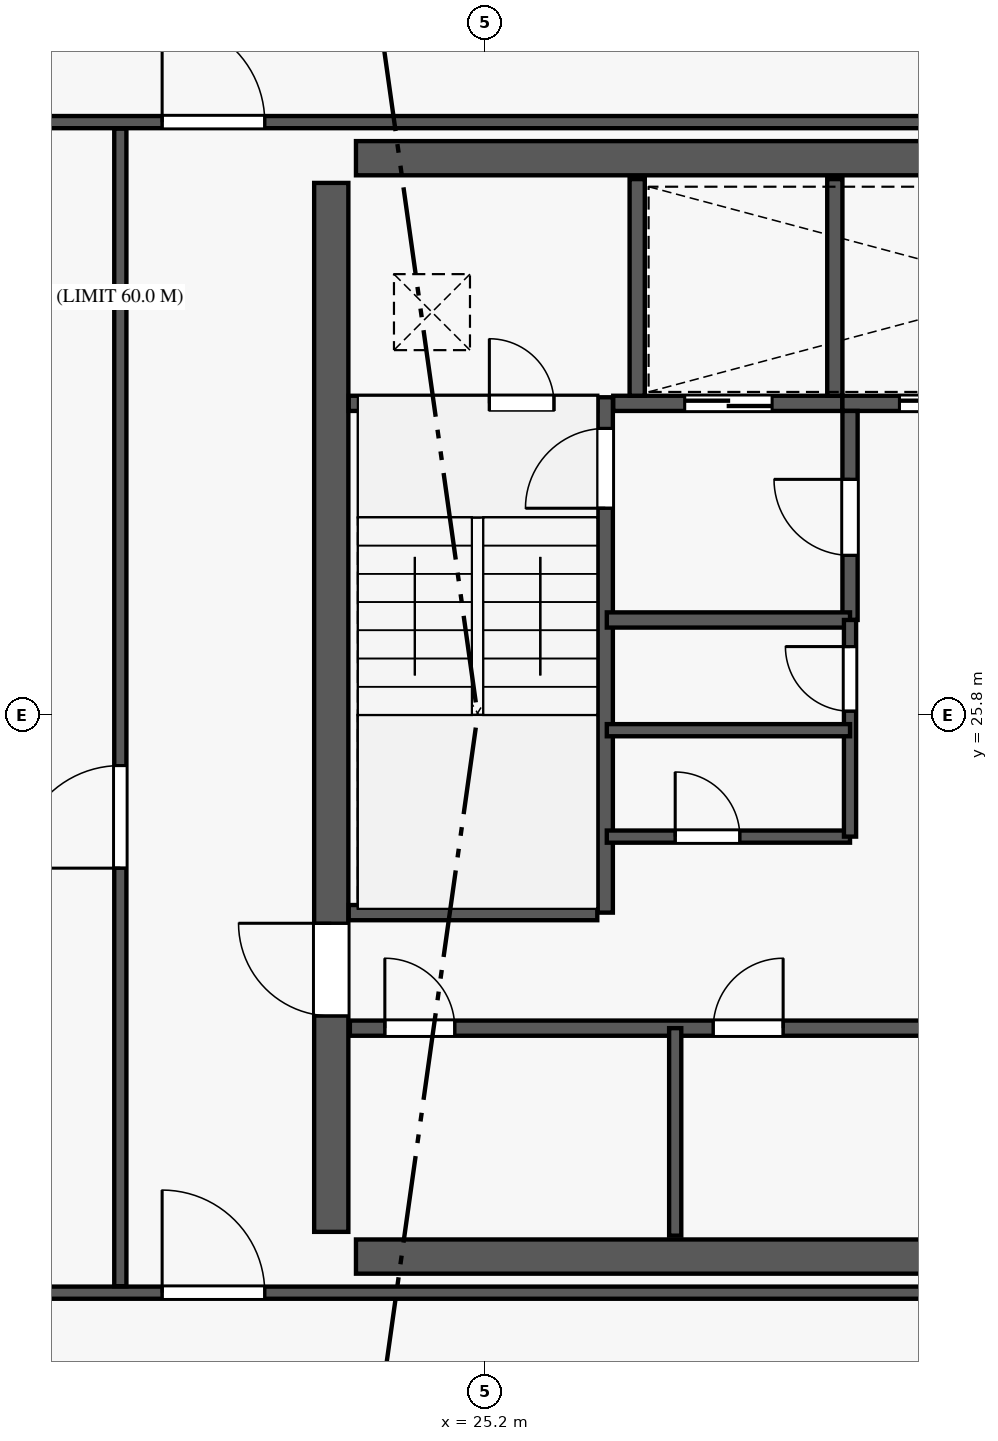
"""IFC4 building model, lengths in metres.
Left out: names, types, materials, properties, quantities, classifications, styles, units other than length and angle.
Written with IfcOpenShell. Run it as: python <this file> out.ifc"""

import sys

from ifc_helpers import new_model, si_unit, direction, frame, frame_2d, origin, origin_2d, place, context, subcontext, project, spatial, rectangle, extrude, element, fill, save


model = new_model("IFC4")
c1 = context("Model", 3, precision=1e-05, world=origin(), true_north=direction((0.0, 1.0)))
c2 = subcontext(c1, "Body", "Model", "MODEL_VIEW")
j1 = project(units=[si_unit("LENGTHUNIT", "METRE"), si_unit("PLANEANGLEUNIT", "RADIAN")], contexts=[c1])
p1 = place(None, origin())
s1 = spatial("IfcSite", under=j1, at=p1, CompositionType="ELEMENT")
p2 = place(p1, origin())
s2 = spatial("IfcBuilding", under=s1, at=p2, CompositionType="ELEMENT")
p3 = place(p2, frame((0.0, 0.0, 278.1)))
s3 = spatial("IfcBuildingStorey", under=s2, at=p3, CompositionType="ELEMENT", Elevation=278.1)
for number, where, z_axis, x_axis in (
    (1, (23.175, 18.675, 0.0), (0.0, 0.0, 1.0), (1.0, 0.0, 0.0)),
    (2, (23.175, 33.125, 0.0), (0.0, 0.0, 1.0), (1.0, 0.0, 0.0)),
):
    element("IfcColumn", number, at=place(p3, frame(where, z_axis=z_axis, x_axis=x_axis)), inside=s3, PredefinedType="COLUMN", context=c2, shape_type="SweptSolid", body=[
        extrude(rectangle(XDim=0.65, YDim=0.65, at=origin_2d()), origin(), (0.0, 0.0, 1.0), 5.4),
    ])
for number, where, z_axis, x_axis in (
    (3, (23.5, 18.675, 0.0), (0.0, 0.0, 1.0), (1.0, 0.0, 0.0)),
    (4, (23.5, 33.125, 0.0), (0.0, 0.0, 1.0), (1.0, 0.0, 0.0)),
):
    element("IfcWall", number, at=place(p3, frame(where, z_axis=z_axis, x_axis=x_axis)), inside=s3, PredefinedType="SHEAR", context=c2, shape_type="SweptSolid", body=[
        extrude(rectangle(XDim=17.8, YDim=0.45, at=frame_2d((8.9, 0.0))), origin(), (0.0, 0.0, 1.0), 5.2),
    ])
p4 = place(p3, frame((23.175, 19.0, 0.0), z_axis=(0.0, 0.0, 1.0), x_axis=(0.0, 1.0, 0.0)))
e5 = element("IfcWall", 5, at=p4, inside=s3, PredefinedType="SHEAR", context=c2, shape_type="SweptSolid", body=[
    extrude(rectangle(XDim=13.8, YDim=0.45, at=frame_2d((6.9, 0.0))), origin(), (0.0, 0.0, 1.0), 5.2),
])
p5 = place(p4, frame((2.84, 0.0, 0.0)))
e6 = element("IfcOpeningElement", 6, at=p5, cuts=e5, PredefinedType="OPENING", context=c2, shape_type="SweptSolid", body=[
    extrude(rectangle(XDim=1.22, YDim=2.25, at=frame_2d((0.61, 1.125))), frame((0.0, 0.235, 0.0), z_axis=(0.0, -1.0, 0.0), x_axis=(1.0, 0.0, 0.0)), (0.0, 0.0, 1.0), 0.47),
])
p6 = place(p3, frame((26.78, 23.2, 0.0), z_axis=(0.0, 0.0, 1.0), x_axis=(0.0, 1.0, 0.0)))
e7 = element("IfcWall", 7, at=p6, inside=s3, PredefinedType="SHEAR", context=c2, shape_type="SweptSolid", body=[
    extrude(rectangle(XDim=6.78, YDim=0.2, at=frame_2d((3.39, 0.0))), origin(), (0.0, 0.0, 1.0), 5.4),
])
p7 = place(p6, frame((5.32, 0.0, 0.0)))
e8 = element("IfcOpeningElement", 8, at=p7, cuts=e7, PredefinedType="OPENING", context=c2, shape_type="SweptSolid", body=[
    extrude(rectangle(XDim=1.05, YDim=2.15, at=frame_2d((0.525, 1.075))), frame((0.0, 0.11, 0.0), z_axis=(0.0, -1.0, 0.0), x_axis=(1.0, 0.0, 0.0)), (0.0, 0.0, 1.0), 0.22),
])
p8 = place(p3, frame((23.405, 23.2, 0.0), z_axis=(0.0, 0.0, 1.0), x_axis=(1.0, 0.0, 0.0)))
e9 = element("IfcWall", 9, at=p8, inside=s3, PredefinedType="PLUMBINGWALL", context=c2, shape_type="SweptSolid", body=[
    extrude(rectangle(XDim=3.27, YDim=0.2, at=frame_2d((1.635, 0.0))), origin(), (0.0, 0.0, 1.0), 5.2),
])
p9 = place(p3, frame((23.405, 29.9, 0.0), z_axis=(0.0, 0.0, 1.0), x_axis=(1.0, 0.0, 0.0)))
e10 = element("IfcWall", 10, at=p9, inside=s3, PredefinedType="PLUMBINGWALL", context=c2, shape_type="SweptSolid", body=[
    extrude(rectangle(XDim=3.27, YDim=0.2, at=frame_2d((1.635, 0.0))), origin(), (0.0, 0.0, 1.0), 5.2),
])
p10 = place(p9, frame((1.85, 0.0, 0.0)))
e11 = element("IfcOpeningElement", 11, at=p10, cuts=e10, PredefinedType="OPENING", context=c2, shape_type="SweptSolid", body=[
    extrude(rectangle(XDim=0.85, YDim=2.05, at=frame_2d((0.425, 1.025))), frame((0.0, 0.11, 0.0), z_axis=(0.0, -1.0, 0.0), x_axis=(1.0, 0.0, 0.0)), (0.0, 0.0, 1.0), 0.22),
])
p11 = place(p3, frame((26.885, 29.9, 0.0), z_axis=(0.0, 0.0, 1.0), x_axis=(1.0, 0.0, 0.0)))
e12 = element("IfcWall", 12, at=p11, inside=s3, PredefinedType="PLUMBINGWALL", context=c2, shape_type="SweptSolid", body=[
    extrude(rectangle(XDim=3.015, YDim=0.2, at=frame_2d((1.507, 0.0))), origin(), (0.0, 0.0, 1.0), 5.2),
])
p12 = place(p11, frame((0.94, 0.0, 0.0)))
e13 = element("IfcOpeningElement", 13, at=p12, cuts=e12, PredefinedType="OPENING", context=c2, shape_type="SweptSolid", body=[
    extrude(rectangle(XDim=1.15, YDim=2.2, at=frame_2d((0.575, 1.1))), frame((0.0, 0.11, 0.0), z_axis=(0.0, -1.0, 0.0), x_axis=(1.0, 0.0, 0.0)), (0.0, 0.0, 1.0), 0.22),
])
p13 = place(p3, frame((29.9, 29.9, 0.0), z_axis=(0.0, 0.0, 1.0), x_axis=(1.0, 0.0, 0.0)))
e14 = element("IfcWall", 14, at=p13, inside=s3, PredefinedType="PLUMBINGWALL", context=c2, shape_type="SweptSolid", body=[
    extrude(rectangle(XDim=5.0, YDim=0.2, at=frame_2d((2.5, 0.0))), origin(), (0.0, 0.0, 1.0), 5.2),
])
p14 = place(p13, frame((0.75, 0.0, 0.0)))
e15 = element("IfcOpeningElement", 15, at=p14, cuts=e14, PredefinedType="OPENING", context=c2, shape_type="SweptSolid", body=[
    extrude(rectangle(XDim=1.1, YDim=2.2, at=frame_2d((0.55, 1.1))), frame((0.0, 0.11, 0.0), z_axis=(0.0, -1.0, 0.0), x_axis=(1.0, 0.0, 0.0)), (0.0, 0.0, 1.0), 0.22),
])
p15 = place(p13, frame((3.15, 0.0, 0.0)))
e16 = element("IfcOpeningElement", 16, at=p15, cuts=e14, PredefinedType="OPENING", context=c2, shape_type="SweptSolid", body=[
    extrude(rectangle(XDim=1.1, YDim=2.2, at=frame_2d((0.55, 1.1))), frame((0.0, 0.11, 0.0), z_axis=(0.0, -1.0, 0.0), x_axis=(1.0, 0.0, 0.0)), (0.0, 0.0, 1.0), 0.22),
])
for number, where, z_axis, x_axis in (
    (17, (27.2, 30.0, 0.0), (0.0, 0.0, 1.0), (0.0, 1.0, 0.0)),
    (18, (29.8, 30.0, 0.0), (0.0, 0.0, 1.0), (0.0, 1.0, 0.0)),
):
    element("IfcWall", number, at=place(p3, frame(where, z_axis=z_axis, x_axis=x_axis)), inside=s3, PredefinedType="PLUMBINGWALL", context=c2, shape_type="SweptSolid", body=[
        extrude(rectangle(XDim=2.85, YDim=0.2, at=frame_2d((1.425, 0.0))), origin(), (0.0, 0.0, 1.0), 5.2),
    ])
p16 = place(p3, frame((30.0, 27.05, 0.0), z_axis=(0.0, 0.0, 1.0), x_axis=(0.0, 1.0, 0.0)))
e19 = element("IfcWall", 19, at=p16, inside=s3, PredefinedType="PLUMBINGWALL", context=c2, shape_type="SweptSolid", body=[
    extrude(rectangle(XDim=2.75, YDim=0.2, at=frame_2d((1.375, 0.0))), origin(), (0.0, 0.0, 1.0), 5.2),
])
p17 = place(p16, frame((0.85, 0.0, 0.0)))
e20 = element("IfcOpeningElement", 20, at=p17, cuts=e19, PredefinedType="OPENING", context=c2, shape_type="SweptSolid", body=[
    extrude(rectangle(XDim=1.0, YDim=2.15, at=frame_2d((0.5, 1.075))), frame((0.0, 0.11, 0.0), z_axis=(0.0, -1.0, 0.0), x_axis=(1.0, 0.0, 0.0)), (0.0, 0.0, 1.0), 0.22),
])
p18 = place(p3, frame((26.8, 27.05, 0.0), z_axis=(0.0, 0.0, 1.0), x_axis=(1.0, 0.0, 0.0)))
e21 = element("IfcWall", 21, at=p18, inside=s3, PredefinedType="PLUMBINGWALL", context=c2, shape_type="SweptSolid", body=[
    extrude(rectangle(XDim=3.2, YDim=0.2, at=frame_2d((1.6, 0.0))), origin(), (0.0, 0.0, 1.0), 5.2),
])
p19 = place(p3, frame((26.8, 24.2, 0.0), z_axis=(0.0, 0.0, 1.0), x_axis=(1.0, 0.0, 0.0)))
e22 = element("IfcWall", 22, at=p19, inside=s3, PredefinedType="PARTITIONING", context=c2, shape_type="SweptSolid", body=[
    extrude(rectangle(XDim=3.2, YDim=0.16, at=frame_2d((1.6, 0.0))), origin(), (0.0, 0.0, 1.0), 5.2),
])
p20 = place(p19, frame((0.9, 0.0, 0.0)))
e23 = element("IfcOpeningElement", 23, at=p20, cuts=e22, PredefinedType="OPENING", context=c2, shape_type="SweptSolid", body=[
    extrude(rectangle(XDim=0.85, YDim=2.05, at=frame_2d((0.425, 1.025))), frame((0.0, 0.09, 0.0), z_axis=(0.0, -1.0, 0.0), x_axis=(1.0, 0.0, 0.0)), (0.0, 0.0, 1.0), 0.18),
])
p21 = place(p3, frame((30.0, 24.2, 0.0), z_axis=(0.0, 0.0, 1.0), x_axis=(0.0, 1.0, 0.0)))
e24 = element("IfcWall", 24, at=p21, inside=s3, PredefinedType="PARTITIONING", context=c2, shape_type="SweptSolid", body=[
    extrude(rectangle(XDim=2.85, YDim=0.16, at=frame_2d((1.425, 0.0))), origin(), (0.0, 0.0, 1.0), 5.2),
])
p22 = place(p21, frame((1.65, 0.0, 0.0)))
e25 = element("IfcOpeningElement", 25, at=p22, cuts=e24, PredefinedType="OPENING", context=c2, shape_type="SweptSolid", body=[
    extrude(rectangle(XDim=0.85, YDim=2.05, at=frame_2d((0.425, 1.025))), frame((0.0, 0.09, 0.0), z_axis=(0.0, -1.0, 0.0), x_axis=(1.0, 0.0, 0.0)), (0.0, 0.0, 1.0), 0.18),
])
p23 = place(p3, frame((26.8, 25.6, 0.0), z_axis=(0.0, 0.0, 1.0), x_axis=(1.0, 0.0, 0.0)))
e26 = element("IfcWall", 26, at=p23, inside=s3, PredefinedType="PARTITIONING", context=c2, shape_type="SweptSolid", body=[
    extrude(rectangle(XDim=3.2, YDim=0.16, at=frame_2d((1.6, 0.0))), origin(), (0.0, 0.0, 1.0), 5.2),
])
p24 = place(p3, frame((23.42, 21.68, 0.0), z_axis=(0.0, 0.0, 1.0), x_axis=(1.0, 0.0, 0.0)))
e27 = element("IfcWall", 27, at=p24, inside=s3, PredefinedType="PLUMBINGWALL", context=c2, shape_type="SweptSolid", body=[
    extrude(rectangle(XDim=17.96, YDim=0.2, at=frame_2d((8.98, 0.0))), origin(), (0.0, 0.0, 1.0), 5.2),
])
p25 = place(p24, frame((0.46, 0.0, 0.0)))
e28 = element("IfcOpeningElement", 28, at=p25, cuts=e27, PredefinedType="OPENING", context=c2, shape_type="SweptSolid", body=[
    extrude(rectangle(XDim=0.92, YDim=2.15, at=frame_2d((0.46, 1.075))), frame((0.0, 0.11, 0.0), z_axis=(0.0, -1.0, 0.0), x_axis=(1.0, 0.0, 0.0)), (0.0, 0.0, 1.0), 0.22),
])
p26 = place(p24, frame((4.78, 0.0, 0.0)))
e29 = element("IfcOpeningElement", 29, at=p26, cuts=e27, PredefinedType="OPENING", context=c2, shape_type="SweptSolid", body=[
    extrude(rectangle(XDim=0.92, YDim=2.15, at=frame_2d((0.46, 1.075))), frame((0.0, 0.11, 0.0), z_axis=(0.0, -1.0, 0.0), x_axis=(1.0, 0.0, 0.0)), (0.0, 0.0, 1.0), 0.22),
])
p27 = place(p24, frame((9.48, 0.0, 0.0)))
e30 = element("IfcOpeningElement", 30, at=p27, cuts=e27, PredefinedType="OPENING", context=c2, shape_type="SweptSolid", body=[
    extrude(rectangle(XDim=0.92, YDim=2.15, at=frame_2d((0.46, 1.075))), frame((0.0, 0.11, 0.0), z_axis=(0.0, -1.0, 0.0), x_axis=(1.0, 0.0, 0.0)), (0.0, 0.0, 1.0), 0.22),
])
p28 = place(p24, frame((14.08, 0.0, 0.0)))
e31 = element("IfcOpeningElement", 31, at=p28, cuts=e27, PredefinedType="OPENING", context=c2, shape_type="SweptSolid", body=[
    extrude(rectangle(XDim=0.92, YDim=2.15, at=frame_2d((0.46, 1.075))), frame((0.0, 0.11, 0.0), z_axis=(0.0, -1.0, 0.0), x_axis=(1.0, 0.0, 0.0)), (0.0, 0.0, 1.0), 0.22),
])
p29 = place(p3, frame((27.7, 18.95, 0.0), z_axis=(0.0, 0.0, 1.0), x_axis=(0.0, 1.0, 0.0)))
e32 = element("IfcWall", 32, at=p29, inside=s3, PredefinedType="PARTITIONING", context=c2, shape_type="SweptSolid", body=[
    extrude(rectangle(XDim=2.73, YDim=0.16, at=frame_2d((1.365, 0.0))), origin(), (0.0, 0.0, 1.0), 5.2),
])
p30 = place(p3, frame((14.978, 18.2, 0.0), z_axis=(0.0, 0.0, 1.0), x_axis=(1.0, 0.0, 0.0)))
e33 = element("IfcWall", 33, at=p30, inside=s3, PredefinedType="PARTITIONING", context=c2, shape_type="SweptSolid", body=[
    extrude(rectangle(XDim=34.844, YDim=0.16, at=frame_2d((17.422, 0.0))), origin(), (0.0, 0.0, 1.0), 5.2),
])
p31 = place(p30, frame((5.972, 0.0, 0.0)))
e34 = element("IfcOpeningElement", 34, at=p31, cuts=e33, PredefinedType="OPENING", context=c2, shape_type="SweptSolid", body=[
    extrude(rectangle(XDim=1.35, YDim=2.35, at=frame_2d((0.675, 1.175))), frame((0.0, 0.09, 0.0), z_axis=(0.0, -1.0, 0.0), x_axis=(1.0, 0.0, 0.0)), (0.0, 0.0, 1.0), 0.18),
])
p32 = place(p30, frame((27.722, 0.0, 0.0)))
e35 = element("IfcOpeningElement", 35, at=p32, cuts=e33, PredefinedType="OPENING", context=c2, shape_type="SweptSolid", body=[
    extrude(rectangle(XDim=1.35, YDim=2.35, at=frame_2d((0.675, 1.175))), frame((0.0, 0.09, 0.0), z_axis=(0.0, -1.0, 0.0), x_axis=(1.0, 0.0, 0.0)), (0.0, 0.0, 1.0), 0.18),
])
p33 = place(p3, frame((20.4, 18.285, 0.0), z_axis=(0.0, 0.0, 1.0), x_axis=(0.0, 1.0, 0.0)))
e36 = element("IfcWall", 36, at=p33, inside=s3, PredefinedType="PARTITIONING", context=c2, shape_type="SweptSolid", body=[
    extrude(rectangle(XDim=15.23, YDim=0.16, at=frame_2d((7.615, 0.0))), origin(), (0.0, 0.0, 1.0), 4.887),
])
p34 = place(p33, frame((5.5, 0.0, 0.0)))
e37 = element("IfcOpeningElement", 37, at=p34, cuts=e36, PredefinedType="OPENING", context=c2, shape_type="SweptSolid", body=[
    extrude(rectangle(XDim=1.35, YDim=2.35, at=frame_2d((0.675, 1.175))), frame((0.0, 0.09, 0.0), z_axis=(0.0, -1.0, 0.0), x_axis=(1.0, 0.0, 0.0)), (0.0, 0.0, 1.0), 0.18),
])
p35 = place(p3, frame((15.079, 33.6, 0.0), z_axis=(0.0, 0.0, 1.0), x_axis=(1.0, 0.0, 0.0)))
e38 = element("IfcWall", 38, at=p35, inside=s3, PredefinedType="PARTITIONING", context=c2, shape_type="SweptSolid", body=[
    extrude(rectangle(XDim=34.642, YDim=0.16, at=frame_2d((17.321, 0.0))), origin(), (0.0, 0.0, 1.0), 5.2),
])
p36 = place(p35, frame((5.871, 0.0, 0.0)))
e39 = element("IfcOpeningElement", 39, at=p36, cuts=e38, PredefinedType="OPENING", context=c2, shape_type="SweptSolid", body=[
    extrude(rectangle(XDim=1.35, YDim=2.35, at=frame_2d((0.675, 1.175))), frame((0.0, 0.09, 0.0), z_axis=(0.0, -1.0, 0.0), x_axis=(1.0, 0.0, 0.0)), (0.0, 0.0, 1.0), 0.18),
])
p37 = place(p35, frame((27.271, 0.0, 0.0)))
e40 = element("IfcOpeningElement", 40, at=p37, cuts=e38, PredefinedType="OPENING", context=c2, shape_type="SweptSolid", body=[
    extrude(rectangle(XDim=1.35, YDim=2.35, at=frame_2d((0.675, 1.175))), frame((0.0, 0.09, 0.0), z_axis=(0.0, -1.0, 0.0), x_axis=(1.0, 0.0, 0.0)), (0.0, 0.0, 1.0), 0.18),
])
p38 = place(p5, origin())
e41 = element("IfcDoor", 41, at=p38, inside=s3, OperationType="SINGLE_SWING_RIGHT", PredefinedType="DOOR", context=c2, shape_type="SweptSolid", body=[
    extrude(rectangle(XDim=1.22, YDim=2.25, at=frame_2d((0.61, 1.125))), frame((0.0, 0.025, 0.0), z_axis=(0.0, -1.0, 0.0), x_axis=(1.0, 0.0, 0.0)), (0.0, 0.0, 1.0), 0.05),
])
fill(e6, e41)
p39 = place(p7, origin())
e42 = element("IfcDoor", 42, at=p39, inside=s3, OperationType="SINGLE_SWING_LEFT", PredefinedType="DOOR", context=c2, shape_type="SweptSolid", body=[
    extrude(rectangle(XDim=1.05, YDim=2.15, at=frame_2d((0.525, 1.075))), frame((0.0, 0.025, 0.0), z_axis=(0.0, -1.0, 0.0), x_axis=(1.0, 0.0, 0.0)), (0.0, 0.0, 1.0), 0.05),
])
fill(e8, e42)
p40 = place(p10, origin())
e43 = element("IfcDoor", 43, at=p40, inside=s3, OperationType="SINGLE_SWING_LEFT", PredefinedType="DOOR", context=c2, shape_type="SweptSolid", body=[
    extrude(rectangle(XDim=0.85, YDim=2.05, at=frame_2d((0.425, 1.025))), frame((0.0, 0.025, 0.0), z_axis=(0.0, -1.0, 0.0), x_axis=(1.0, 0.0, 0.0)), (0.0, 0.0, 1.0), 0.05),
])
fill(e11, e43)
p41 = place(p12, origin())
e44 = element("IfcDoor", 44, at=p41, inside=s3, OperationType="DOUBLE_DOOR_SLIDING", PredefinedType="DOOR", context=c2, shape_type="SweptSolid", body=[
    extrude(rectangle(XDim=1.15, YDim=2.2, at=frame_2d((0.575, 1.1))), frame((0.0, 0.025, 0.0), z_axis=(0.0, -1.0, 0.0), x_axis=(1.0, 0.0, 0.0)), (0.0, 0.0, 1.0), 0.05),
])
fill(e13, e44)
p42 = place(p14, origin())
e45 = element("IfcDoor", 45, at=p42, inside=s3, OperationType="DOUBLE_DOOR_SLIDING", PredefinedType="DOOR", context=c2, shape_type="SweptSolid", body=[
    extrude(rectangle(XDim=1.1, YDim=2.2, at=frame_2d((0.55, 1.1))), frame((0.0, 0.025, 0.0), z_axis=(0.0, -1.0, 0.0), x_axis=(1.0, 0.0, 0.0)), (0.0, 0.0, 1.0), 0.05),
])
fill(e15, e45)
p43 = place(p17, origin())
e46 = element("IfcDoor", 46, at=p43, inside=s3, OperationType="SINGLE_SWING_RIGHT", PredefinedType="DOOR", context=c2, shape_type="SweptSolid", body=[
    extrude(rectangle(XDim=1.0, YDim=2.15, at=frame_2d((0.5, 1.075))), frame((0.0, 0.025, 0.0), z_axis=(0.0, -1.0, 0.0), x_axis=(1.0, 0.0, 0.0)), (0.0, 0.0, 1.0), 0.05),
])
fill(e20, e46)
p44 = place(p20, origin())
e47 = element("IfcDoor", 47, at=p44, inside=s3, OperationType="SINGLE_SWING_LEFT", PredefinedType="DOOR", context=c2, shape_type="SweptSolid", body=[
    extrude(rectangle(XDim=0.85, YDim=2.05, at=frame_2d((0.425, 1.025))), frame((0.0, 0.025, 0.0), z_axis=(0.0, -1.0, 0.0), x_axis=(1.0, 0.0, 0.0)), (0.0, 0.0, 1.0), 0.05),
])
fill(e23, e47)
p45 = place(p22, origin())
e48 = element("IfcDoor", 48, at=p45, inside=s3, OperationType="SINGLE_SWING_RIGHT", PredefinedType="DOOR", context=c2, shape_type="SweptSolid", body=[
    extrude(rectangle(XDim=0.85, YDim=2.05, at=frame_2d((0.425, 1.025))), frame((0.0, 0.025, 0.0), z_axis=(0.0, -1.0, 0.0), x_axis=(1.0, 0.0, 0.0)), (0.0, 0.0, 1.0), 0.05),
])
fill(e25, e48)
p46 = place(p25, origin())
e49 = element("IfcDoor", 49, at=p46, inside=s3, OperationType="SINGLE_SWING_LEFT", PredefinedType="DOOR", context=c2, shape_type="SweptSolid", body=[
    extrude(rectangle(XDim=0.92, YDim=2.15, at=frame_2d((0.46, 1.075))), frame((0.0, 0.025, 0.0), z_axis=(0.0, -1.0, 0.0), x_axis=(1.0, 0.0, 0.0)), (0.0, 0.0, 1.0), 0.05),
])
fill(e28, e49)
p47 = place(p26, origin())
e50 = element("IfcDoor", 50, at=p47, inside=s3, OperationType="SINGLE_SWING_RIGHT", PredefinedType="DOOR", context=c2, shape_type="SweptSolid", body=[
    extrude(rectangle(XDim=0.92, YDim=2.15, at=frame_2d((0.46, 1.075))), frame((0.0, 0.025, 0.0), z_axis=(0.0, -1.0, 0.0), x_axis=(1.0, 0.0, 0.0)), (0.0, 0.0, 1.0), 0.05),
])
fill(e29, e50)
p48 = place(p31, origin())
e51 = element("IfcDoor", 51, at=p48, inside=s3, OperationType="SINGLE_SWING_LEFT", PredefinedType="DOOR", context=c2, shape_type="SweptSolid", body=[
    extrude(rectangle(XDim=1.35, YDim=2.35, at=frame_2d((0.675, 1.175))), frame((0.0, 0.025, 0.0), z_axis=(0.0, -1.0, 0.0), x_axis=(1.0, 0.0, 0.0)), (0.0, 0.0, 1.0), 0.05),
])
fill(e34, e51)
p49 = place(p34, origin())
e52 = element("IfcDoor", 52, at=p49, inside=s3, OperationType="SINGLE_SWING_LEFT", PredefinedType="DOOR", context=c2, shape_type="SweptSolid", body=[
    extrude(rectangle(XDim=1.35, YDim=2.35, at=frame_2d((0.675, 1.175))), frame((0.0, 0.025, 0.0), z_axis=(0.0, -1.0, 0.0), x_axis=(1.0, 0.0, 0.0)), (0.0, 0.0, 1.0), 0.05),
])
fill(e37, e52)
p50 = place(p36, origin())
e53 = element("IfcDoor", 53, at=p50, inside=s3, OperationType="SINGLE_SWING_LEFT", PredefinedType="DOOR", context=c2, shape_type="SweptSolid", body=[
    extrude(rectangle(XDim=1.35, YDim=2.35, at=frame_2d((0.675, 1.175))), frame((0.0, 0.025, 0.0), z_axis=(0.0, -1.0, 0.0), x_axis=(1.0, 0.0, 0.0)), (0.0, 0.0, 1.0), 0.05),
])
fill(e39, e53)
save(model, sys.argv[1])
